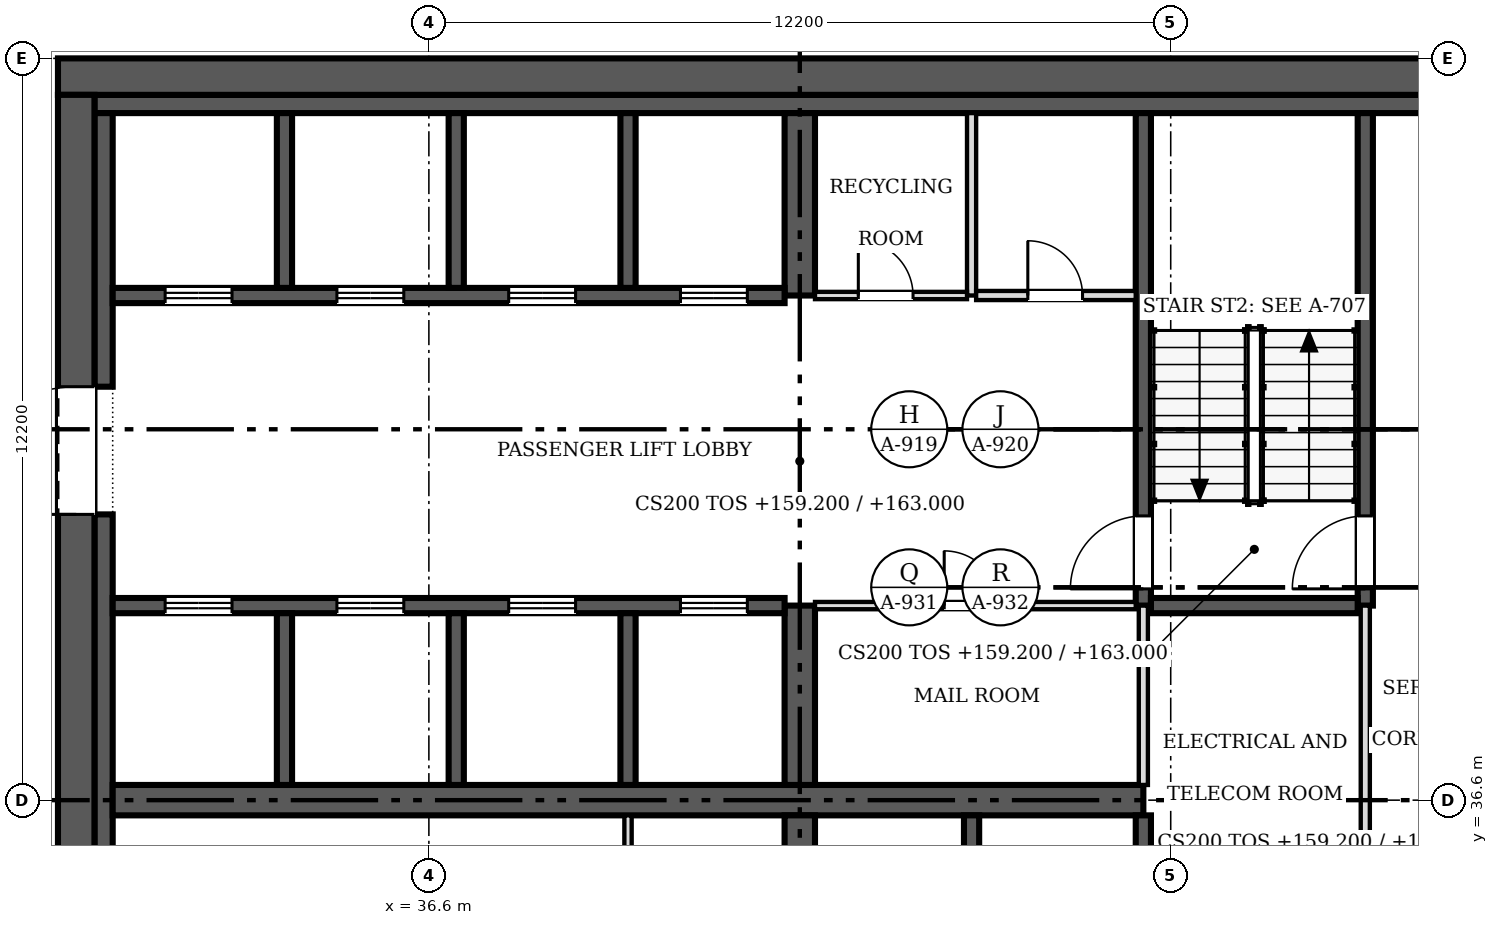
"""IFC4 building model, lengths in metres.
Left out: names, types, materials, properties, quantities, classifications, styles, units other than length and angle.
Written with IfcOpenShell. Run it as: python <this file> out.ifc"""

import sys

from ifc_helpers import new_model, si_unit, direction, frame, frame_2d, origin, place, context, subcontext, project, spatial, rectangle, extrude, source, transform, mapped, element, fill, save


model = new_model("IFC4")
c1 = context("Model", 3, precision=1e-05, world=origin(), true_north=direction((0.0, 1.0)))
c2 = subcontext(c1, "Body", "Model", "MODEL_VIEW")
j1 = project(units=[si_unit("LENGTHUNIT", "METRE"), si_unit("PLANEANGLEUNIT", "RADIAN")], contexts=[c1])
p1 = place(None, origin())
s1 = spatial("IfcSite", under=j1, at=p1, CompositionType="ELEMENT")
p2 = place(p1, origin())
s2 = spatial("IfcBuilding", under=s1, at=p2, CompositionType="ELEMENT")
p3 = place(p2, frame((0.0, 0.0, 159.2)))
s3 = spatial("IfcBuildingStorey", under=s2, at=p3, CompositionType="ELEMENT", Elevation=159.2)
p4 = place(p3, frame((30.8, 25.0, 0.0), z_axis=(0.0, 0.0, 1.0), x_axis=(0.0, 1.0, 0.0)))
e1 = element("IfcWall", 1, at=p4, inside=s3, PredefinedType="SHEAR", context=c2, shape_type="SweptSolid", body=[
    extrude(rectangle(XDim=23.2, YDim=0.6, at=frame_2d((11.6, 0.0))), origin(), (0.0, 0.0, 1.0), 3.8),
])
m1 = source(origin(), c2, "Body", "SweptSolid", [
    extrude(rectangle(XDim=2.1, YDim=2.4, at=frame_2d((1.05, 1.2))), frame((0.0, 0.31, 0.0), z_axis=(0.0, -1.0, 0.0), x_axis=(1.0, 0.0, 0.0)), (0.0, 0.0, 1.0), 0.62),
])
p5 = place(p4, frame((4.8, 0.0, 0.0)))
e2 = element("IfcOpeningElement", 2, at=p5, cuts=e1, PredefinedType="OPENING", context=c2, shape_type="MappedRepresentation", body=[
    mapped(m1, transform((0.0, 0.0, 0.0), scale=1.0)),
])
p6 = place(p4, frame((16.3, 0.0, 0.0)))
e3 = element("IfcOpeningElement", 3, at=p6, cuts=e1, PredefinedType="OPENING", context=c2, shape_type="MappedRepresentation", body=[
    mapped(m1, transform((0.0, 0.0, 0.0), scale=1.0)),
])
p7 = place(p3, frame((30.5, 48.5, 0.0), z_axis=(0.0, 0.0, 1.0), x_axis=(1.0, 0.0, 0.0)))
e4 = element("IfcWall", 4, at=p7, inside=s3, PredefinedType="SHEAR", context=c2, shape_type="SweptSolid", body=[
    extrude(rectangle(XDim=24.4, YDim=0.6, at=frame_2d((12.2, 0.0))), origin(), (0.0, 0.0, 1.0), 3.8),
])
p8 = place(p3, frame((31.1, 48.05, 0.0), z_axis=(0.0, 0.0, 1.0), x_axis=(1.0, 0.0, 0.0)))
e5 = element("IfcWall", 5, at=p8, inside=s3, PredefinedType="SOLIDWALL", context=c2, shape_type="SweptSolid", body=[
    extrude(rectangle(XDim=23.2, YDim=0.3, at=frame_2d((11.6, 0.0))), origin(), (0.0, 0.0, 1.0), 3.8),
])
p9 = place(p3, frame((31.25, 31.9, 0.0), z_axis=(0.0, 0.0, 1.0), x_axis=(0.0, 1.0, 0.0)))
e6 = element("IfcWall", 6, at=p9, inside=s3, PredefinedType="SOLIDWALL", context=c2, shape_type="SweptSolid", body=[
    extrude(rectangle(XDim=9.4, YDim=0.3, at=frame_2d((4.7, 0.0))), origin(), (0.0, 0.0, 1.0), 3.8),
])
p10 = place(p3, frame((31.25, 43.4, 0.0), z_axis=(0.0, 0.0, 1.0), x_axis=(0.0, 1.0, 0.0)))
e7 = element("IfcWall", 7, at=p10, inside=s3, PredefinedType="SOLIDWALL", context=c2, shape_type="SweptSolid", body=[
    extrude(rectangle(XDim=4.5, YDim=0.3, at=frame_2d((2.25, 0.0))), origin(), (0.0, 0.0, 1.0), 3.8),
])
p11 = place(p3, frame((31.4, 36.6, 0.0), z_axis=(0.0, 0.0, 1.0), x_axis=(1.0, 0.0, 0.0)))
e8 = element("IfcWall", 8, at=p11, inside=s3, PredefinedType="SHEAR", context=c2, shape_type="SweptSolid", body=[
    extrude(rectangle(XDim=16.95, YDim=0.5, at=frame_2d((8.475, 0.0))), origin(), (0.0, 0.0, 1.0), 3.8),
])
p12 = place(p3, frame((42.7, 36.35, 0.0), z_axis=(0.0, 0.0, 1.0), x_axis=(0.0, -1.0, 0.0)))
e9 = element("IfcWall", 9, at=p12, inside=s3, PredefinedType="SHEAR", context=c2, shape_type="SweptSolid", body=[
    extrude(rectangle(XDim=11.05, YDim=0.5, at=frame_2d((5.525, 0.0))), origin(), (0.0, 0.0, 1.0), 3.8),
])
m2 = source(origin(), c2, "Body", "SweptSolid", [
    extrude(rectangle(XDim=0.9, YDim=2.1, at=frame_2d((0.45, 1.05))), frame((0.0, 0.26, 0.0), z_axis=(0.0, -1.0, 0.0), x_axis=(1.0, 0.0, 0.0)), (0.0, 0.0, 1.0), 0.52),
])
p13 = place(p12, frame((6.5, 0.0, 0.0)))
e10 = element("IfcOpeningElement", 10, at=p13, cuts=e9, PredefinedType="OPENING", context=c2, shape_type="MappedRepresentation", body=[
    mapped(m2, transform((0.0, 0.0, 0.0), scale=1.0)),
])
m3 = source(origin(), c2, "Body", "SweptSolid", [
    extrude(rectangle(XDim=1.1, YDim=2.1, at=frame_2d((0.55, 1.05))), frame((0.0, 0.26, 0.0), z_axis=(0.0, -1.0, 0.0), x_axis=(1.0, 0.0, 0.0)), (0.0, 0.0, 1.0), 0.52),
])
p14 = place(p12, frame((3.8, 0.0, 0.0)))
e11 = element("IfcOpeningElement", 11, at=p14, cuts=e9, PredefinedType="OPENING", context=c2, shape_type="MappedRepresentation", body=[
    mapped(m3, transform((0.0, 0.0, 0.0), scale=1.0)),
])
p15 = place(p3, frame((42.7, 36.85, 0.0), z_axis=(0.0, 0.0, 1.0), x_axis=(0.0, 1.0, 0.0)))
e12 = element("IfcWall", 12, at=p15, inside=s3, PredefinedType="SHEAR", context=c2, shape_type="SweptSolid", body=[
    extrude(rectangle(XDim=2.95, YDim=0.5, at=frame_2d((1.475, 0.0))), origin(), (0.0, 0.0, 1.0), 3.8),
])
p16 = place(p3, frame((42.7, 44.9, 0.0), z_axis=(0.0, 0.0, 1.0), x_axis=(0.0, 1.0, 0.0)))
e13 = element("IfcWall", 13, at=p16, inside=s3, PredefinedType="SHEAR", context=c2, shape_type="SweptSolid", body=[
    extrude(rectangle(XDim=3.0, YDim=0.5, at=frame_2d((1.5, 0.0))), origin(), (0.0, 0.0, 1.0), 3.8),
])
p17 = place(p3, frame((31.4, 39.8, 0.0), z_axis=(0.0, 0.0, 1.0), x_axis=(1.0, 0.0, 0.0)))
e14 = element("IfcWall", 14, at=p17, inside=s3, PredefinedType="SOLIDWALL", context=c2, shape_type="SweptSolid", body=[
    extrude(rectangle(XDim=11.05, YDim=0.25, at=frame_2d((5.525, 0.0))), origin(), (0.0, 0.0, 1.0), 3.8),
])
m4 = source(origin(), c2, "Body", "SweptSolid", [
    extrude(rectangle(XDim=1.1, YDim=2.1, at=frame_2d((0.55, 1.05))), frame((0.0, 0.135, 0.0), z_axis=(0.0, -1.0, 0.0), x_axis=(1.0, 0.0, 0.0)), (0.0, 0.0, 1.0), 0.27),
])
p18 = place(p17, frame((0.863, 0.0, 0.0)))
e15 = element("IfcOpeningElement", 15, at=p18, cuts=e14, PredefinedType="OPENING", context=c2, shape_type="MappedRepresentation", body=[
    mapped(m4, transform((0.0, 0.0, 0.0), scale=1.0)),
])
p19 = place(p17, frame((3.688, 0.0, 0.0)))
e16 = element("IfcOpeningElement", 16, at=p19, cuts=e14, PredefinedType="OPENING", context=c2, shape_type="MappedRepresentation", body=[
    mapped(m4, transform((0.0, 0.0, 0.0), scale=1.0)),
])
p20 = place(p17, frame((6.512, 0.0, 0.0)))
e17 = element("IfcOpeningElement", 17, at=p20, cuts=e14, PredefinedType="OPENING", context=c2, shape_type="MappedRepresentation", body=[
    mapped(m4, transform((0.0, 0.0, 0.0), scale=1.0)),
])
p21 = place(p17, frame((9.337, 0.0, 0.0)))
e18 = element("IfcOpeningElement", 18, at=p21, cuts=e14, PredefinedType="OPENING", context=c2, shape_type="MappedRepresentation", body=[
    mapped(m4, transform((0.0, 0.0, 0.0), scale=1.0)),
])
p22 = place(p3, frame((42.45, 44.9, 0.0), z_axis=(0.0, 0.0, 1.0), x_axis=(-1.0, 0.0, 0.0)))
e19 = element("IfcWall", 19, at=p22, inside=s3, PredefinedType="SOLIDWALL", context=c2, shape_type="SweptSolid", body=[
    extrude(rectangle(XDim=11.05, YDim=0.25, at=frame_2d((5.525, 0.0))), origin(), (0.0, 0.0, 1.0), 3.8),
])
p23 = place(p22, frame((9.087, 0.0, 0.0)))
e20 = element("IfcOpeningElement", 20, at=p23, cuts=e19, PredefinedType="OPENING", context=c2, shape_type="MappedRepresentation", body=[
    mapped(m4, transform((0.0, 0.0, 0.0), scale=1.0)),
])
p24 = place(p22, frame((6.262, 0.0, 0.0)))
e21 = element("IfcOpeningElement", 21, at=p24, cuts=e19, PredefinedType="OPENING", context=c2, shape_type="MappedRepresentation", body=[
    mapped(m4, transform((0.0, 0.0, 0.0), scale=1.0)),
])
p25 = place(p22, frame((3.438, 0.0, 0.0)))
e22 = element("IfcOpeningElement", 22, at=p25, cuts=e19, PredefinedType="OPENING", context=c2, shape_type="MappedRepresentation", body=[
    mapped(m4, transform((0.0, 0.0, 0.0), scale=1.0)),
])
p26 = place(p22, frame((0.613, 0.0, 0.0)))
e23 = element("IfcOpeningElement", 23, at=p26, cuts=e19, PredefinedType="OPENING", context=c2, shape_type="MappedRepresentation", body=[
    mapped(m4, transform((0.0, 0.0, 0.0), scale=1.0)),
])
p27 = place(p3, frame((48.35, 36.35, 0.0), z_axis=(0.0, 0.0, 1.0), x_axis=(0.0, -1.0, 0.0)))
e24 = element("IfcWall", 24, at=p27, inside=s3, PredefinedType="SOLIDWALL", context=c2, shape_type="SweptSolid", body=[
    extrude(rectangle(XDim=11.05, YDim=0.25, at=frame_2d((5.525, 0.0))), origin(), (0.0, 0.0, 1.0), 3.8),
])
m5 = source(origin(), c2, "Body", "SweptSolid", [
    extrude(rectangle(XDim=1.2, YDim=2.1, at=frame_2d((0.6, 1.05))), frame((0.0, 0.135, 0.0), z_axis=(0.0, -1.0, 0.0), x_axis=(1.0, 0.0, 0.0)), (0.0, 0.0, 1.0), 0.27),
])
p28 = place(p27, frame((3.225, 0.0, 0.0)))
e25 = element("IfcOpeningElement", 25, at=p28, cuts=e24, PredefinedType="OPENING", context=c2, shape_type="MappedRepresentation", body=[
    mapped(m5, transform((0.0, 0.0, 0.0), scale=1.0)),
])
p29 = place(p3, frame((48.35, 47.9, 0.0), z_axis=(0.0, 0.0, 1.0), x_axis=(0.0, -1.0, 0.0)))
e26 = element("IfcWall", 26, at=p29, inside=s3, PredefinedType="SOLIDWALL", context=c2, shape_type="SweptSolid", body=[
    extrude(rectangle(XDim=8.1, YDim=0.25, at=frame_2d((4.05, 0.0))), origin(), (0.0, 0.0, 1.0), 3.8),
])
p30 = place(p29, frame((6.625, 0.0, 0.0)))
e27 = element("IfcOpeningElement", 27, at=p30, cuts=e26, PredefinedType="OPENING", context=c2, shape_type="MappedRepresentation", body=[
    mapped(m5, transform((0.0, 0.0, 0.0), scale=1.0)),
])
p31 = place(p3, frame((52.0, 39.8, 0.0), z_axis=(0.0, 0.0, 1.0), x_axis=(0.0, 1.0, 0.0)))
e28 = element("IfcWall", 28, at=p31, inside=s3, PredefinedType="SOLIDWALL", context=c2, shape_type="SweptSolid", body=[
    extrude(rectangle(XDim=8.1, YDim=0.25, at=frame_2d((4.05, 0.0))), origin(), (0.0, 0.0, 1.0), 3.8),
])
p32 = place(p31, frame((0.275, 0.0, 0.0)))
e29 = element("IfcOpeningElement", 29, at=p32, cuts=e28, PredefinedType="OPENING", context=c2, shape_type="MappedRepresentation", body=[
    mapped(m5, transform((0.0, 0.0, 0.0), scale=1.0)),
])
p33 = place(p3, frame((48.475, 39.8, 0.0), z_axis=(0.0, 0.0, 1.0), x_axis=(1.0, 0.0, 0.0)))
e30 = element("IfcWall", 30, at=p33, inside=s3, PredefinedType="SOLIDWALL", context=c2, shape_type="SweptSolid", body=[
    extrude(rectangle(XDim=3.4, YDim=0.25, at=frame_2d((1.7, 0.0))), origin(), (0.0, 0.0, 1.0), 3.8),
])
for number, where, z_axis, x_axis in (
    (31, (34.225, 36.85, 0.0), (0.0, 0.0, 1.0), (0.0, 1.0, 0.0)),
    (32, (37.05, 36.85, 0.0), (0.0, 0.0, 1.0), (0.0, 1.0, 0.0)),
    (33, (39.875, 36.85, 0.0), (0.0, 0.0, 1.0), (0.0, 1.0, 0.0)),
):
    element("IfcWall", number, at=place(p3, frame(where, z_axis=z_axis, x_axis=x_axis)), inside=s3, PredefinedType="SOLIDWALL", context=c2, shape_type="SweptSolid", body=[
        extrude(rectangle(XDim=2.825, YDim=0.25, at=frame_2d((1.413, 0.0))), origin(), (0.0, 0.0, 1.0), 3.8),
    ])
p34 = place(p3, frame((45.525, 33.525, 0.0), z_axis=(0.0, 0.0, 1.0), x_axis=(0.0, 1.0, 0.0)))
e34 = element("IfcWall", 34, at=p34, inside=s3, PredefinedType="SOLIDWALL", context=c2, shape_type="SweptSolid", body=[
    extrude(rectangle(XDim=2.825, YDim=0.25, at=frame_2d((1.413, 0.0))), origin(), (0.0, 0.0, 1.0), 3.8),
])
for number, where, z_axis, x_axis in (
    (35, (34.225, 45.025, 0.0), (0.0, 0.0, 1.0), (0.0, 1.0, 0.0)),
    (36, (37.05, 45.025, 0.0), (0.0, 0.0, 1.0), (0.0, 1.0, 0.0)),
    (37, (39.875, 45.025, 0.0), (0.0, 0.0, 1.0), (0.0, 1.0, 0.0)),
):
    element("IfcWall", number, at=place(p3, frame(where, z_axis=z_axis, x_axis=x_axis)), inside=s3, PredefinedType="SOLIDWALL", context=c2, shape_type="SweptSolid", body=[
        extrude(rectangle(XDim=2.875, YDim=0.25, at=frame_2d((1.438, 0.0))), origin(), (0.0, 0.0, 1.0), 3.8),
    ])
p35 = place(p3, frame((52.0, 33.525, 0.0), z_axis=(0.0, 0.0, 1.0), x_axis=(0.0, 1.0, 0.0)))
e38 = element("IfcWall", 38, at=p35, inside=s3, PredefinedType="PARTITIONING", context=c2, shape_type="SweptSolid", body=[
    extrude(rectangle(XDim=6.275, YDim=0.15, at=frame_2d((3.138, 0.0))), origin(), (0.0, 0.0, 1.0), 3.6),
])
m6 = source(origin(), c2, "Body", "SweptSolid", [
    extrude(rectangle(XDim=0.9, YDim=2.1, at=frame_2d((0.45, 1.05))), frame((0.0, 0.085, 0.0), z_axis=(0.0, -1.0, 0.0), x_axis=(1.0, 0.0, 0.0)), (0.0, 0.0, 1.0), 0.17),
])
p36 = place(p35, frame((1.025, 0.0, 0.0)))
e39 = element("IfcOpeningElement", 39, at=p36, cuts=e38, PredefinedType="OPENING", context=c2, shape_type="MappedRepresentation", body=[
    mapped(m6, transform((0.0, 0.0, 0.0), scale=1.0)),
])
p37 = place(p3, frame((48.225, 39.8, 0.0), z_axis=(0.0, 0.0, 1.0), x_axis=(-1.0, 0.0, 0.0)))
e40 = element("IfcWall", 40, at=p37, inside=s3, PredefinedType="PARTITIONING", context=c2, shape_type="SweptSolid", body=[
    extrude(rectangle(XDim=5.275, YDim=0.12, at=frame_2d((2.638, 0.0))), origin(), (0.0, 0.0, 1.0), 3.6),
])
m7 = source(origin(), c2, "Body", "SweptSolid", [
    extrude(rectangle(XDim=0.9, YDim=2.1, at=frame_2d((0.45, 1.05))), frame((0.0, 0.07, 0.0), z_axis=(0.0, -1.0, 0.0), x_axis=(1.0, 0.0, 0.0)), (0.0, 0.0, 1.0), 0.14),
])
p38 = place(p37, frame((2.25, 0.0, 0.0)))
e41 = element("IfcOpeningElement", 41, at=p38, cuts=e40, PredefinedType="OPENING", context=c2, shape_type="MappedRepresentation", body=[
    mapped(m7, transform((0.0, 0.0, 0.0), scale=1.0)),
])
p39 = place(p3, frame((48.35, 36.85, 0.0), z_axis=(0.0, 0.0, 1.0), x_axis=(0.0, 1.0, 0.0)))
e42 = element("IfcWall", 42, at=p39, inside=s3, PredefinedType="PARTITIONING", context=c2, shape_type="SweptSolid", body=[
    extrude(rectangle(XDim=2.95, YDim=0.15, at=frame_2d((1.475, 0.0))), origin(), (0.0, 0.0, 1.0), 3.6),
])
p40 = place(p3, frame((39.875, 33.46, 0.0), z_axis=(0.0, 0.0, 1.0), x_axis=(0.0, 1.0, 0.0)))
e43 = element("IfcWall", 43, at=p40, inside=s3, PredefinedType="PARTITIONING", context=c2, shape_type="SweptSolid", body=[
    extrude(rectangle(XDim=2.89, YDim=0.12, at=frame_2d((1.445, 0.0))), origin(), (0.0, 0.0, 1.0), 3.6),
])
p41 = place(p3, frame((45.525, 44.9, 0.0), z_axis=(0.0, 0.0, 1.0), x_axis=(0.0, 1.0, 0.0)))
e44 = element("IfcWall", 44, at=p41, inside=s3, PredefinedType="PARTITIONING", context=c2, shape_type="SweptSolid", body=[
    extrude(rectangle(XDim=3.0, YDim=0.15, at=frame_2d((1.5, 0.0))), origin(), (0.0, 0.0, 1.0), 3.6),
])
p42 = place(p3, frame((42.95, 44.9, 0.0), z_axis=(0.0, 0.0, 1.0), x_axis=(1.0, 0.0, 0.0)))
e45 = element("IfcWall", 45, at=p42, inside=s3, PredefinedType="PARTITIONING", context=c2, shape_type="SweptSolid", body=[
    extrude(rectangle(XDim=2.5, YDim=0.12, at=frame_2d((1.25, 0.0))), origin(), (0.0, 0.0, 1.0), 3.6),
])
p43 = place(p42, frame((0.712, 0.0, 0.0)))
e46 = element("IfcOpeningElement", 46, at=p43, cuts=e45, PredefinedType="OPENING", context=c2, shape_type="MappedRepresentation", body=[
    mapped(m7, transform((0.0, 0.0, 0.0), scale=1.0)),
])
p44 = place(p3, frame((45.6, 44.9, 0.0), z_axis=(0.0, 0.0, 1.0), x_axis=(1.0, 0.0, 0.0)))
e47 = element("IfcWall", 47, at=p44, inside=s3, PredefinedType="PARTITIONING", context=c2, shape_type="SweptSolid", body=[
    extrude(rectangle(XDim=2.625, YDim=0.15, at=frame_2d((1.312, 0.0))), origin(), (0.0, 0.0, 1.0), 3.6),
])
p45 = place(p44, frame((0.85, 0.0, 0.0)))
e48 = element("IfcOpeningElement", 48, at=p45, cuts=e47, PredefinedType="OPENING", context=c2, shape_type="MappedRepresentation", body=[
    mapped(m6, transform((0.0, 0.0, 0.0), scale=1.0)),
])
m8 = source(origin(), c2, "Body", "SweptSolid", [
    extrude(rectangle(XDim=2.1, YDim=2.4, at=frame_2d((1.05, 1.2))), frame((0.0, 0.025, 0.0), z_axis=(0.0, -1.0, 0.0), x_axis=(1.0, 0.0, 0.0)), (0.0, 0.0, 1.0), 0.05),
])
p46 = place(p6, origin())
e49 = element("IfcDoor", 49, at=p46, inside=s3, OperationType="DOUBLE_DOOR_SINGLE_SWING", PredefinedType="DOOR", context=c2, shape_type="MappedRepresentation", body=[
    mapped(m8, transform((0.0, 0.0, 0.0), scale=1.0)),
])
fill(e3, e49)
m9 = source(origin(), c2, "Body", "SweptSolid", [
    extrude(rectangle(XDim=1.1, YDim=2.1, at=frame_2d((0.55, 1.05))), frame((0.0, 0.025, 0.0), z_axis=(0.0, -1.0, 0.0), x_axis=(1.0, 0.0, 0.0)), (0.0, 0.0, 1.0), 0.05),
])
p47 = place(p18, origin())
e50 = element("IfcDoor", 50, at=p47, inside=s3, OperationType="DOUBLE_DOOR_SLIDING", PredefinedType="DOOR", context=c2, shape_type="MappedRepresentation", body=[
    mapped(m9, transform((0.0, 0.0, 0.0), scale=1.0)),
])
fill(e15, e50)
p48 = place(p19, origin())
e51 = element("IfcDoor", 51, at=p48, inside=s3, OperationType="DOUBLE_DOOR_SLIDING", PredefinedType="DOOR", context=c2, shape_type="MappedRepresentation", body=[
    mapped(m9, transform((0.0, 0.0, 0.0), scale=1.0)),
])
fill(e16, e51)
p49 = place(p20, origin())
e52 = element("IfcDoor", 52, at=p49, inside=s3, OperationType="DOUBLE_DOOR_SLIDING", PredefinedType="DOOR", context=c2, shape_type="MappedRepresentation", body=[
    mapped(m9, transform((0.0, 0.0, 0.0), scale=1.0)),
])
fill(e17, e52)
p50 = place(p21, origin())
e53 = element("IfcDoor", 53, at=p50, inside=s3, OperationType="DOUBLE_DOOR_SLIDING", PredefinedType="DOOR", context=c2, shape_type="MappedRepresentation", body=[
    mapped(m9, transform((0.0, 0.0, 0.0), scale=1.0)),
])
fill(e18, e53)
p51 = place(p23, origin())
e54 = element("IfcDoor", 54, at=p51, inside=s3, OperationType="DOUBLE_DOOR_SLIDING", PredefinedType="DOOR", context=c2, shape_type="MappedRepresentation", body=[
    mapped(m9, transform((0.0, 0.0, 0.0), scale=1.0)),
])
fill(e20, e54)
p52 = place(p24, origin())
e55 = element("IfcDoor", 55, at=p52, inside=s3, OperationType="DOUBLE_DOOR_SLIDING", PredefinedType="DOOR", context=c2, shape_type="MappedRepresentation", body=[
    mapped(m9, transform((0.0, 0.0, 0.0), scale=1.0)),
])
fill(e21, e55)
p53 = place(p25, origin())
e56 = element("IfcDoor", 56, at=p53, inside=s3, OperationType="DOUBLE_DOOR_SLIDING", PredefinedType="DOOR", context=c2, shape_type="MappedRepresentation", body=[
    mapped(m9, transform((0.0, 0.0, 0.0), scale=1.0)),
])
fill(e22, e56)
p54 = place(p26, origin())
e57 = element("IfcDoor", 57, at=p54, inside=s3, OperationType="DOUBLE_DOOR_SLIDING", PredefinedType="DOOR", context=c2, shape_type="MappedRepresentation", body=[
    mapped(m9, transform((0.0, 0.0, 0.0), scale=1.0)),
])
fill(e23, e57)
m10 = source(origin(), c2, "Body", "SweptSolid", [
    extrude(rectangle(XDim=1.2, YDim=2.1, at=frame_2d((0.6, 1.05))), frame((0.0, 0.025, 0.0), z_axis=(0.0, -1.0, 0.0), x_axis=(1.0, 0.0, 0.0)), (0.0, 0.0, 1.0), 0.05),
])
p55 = place(p30, origin())
e58 = element("IfcDoor", 58, at=p55, inside=s3, OperationType="SINGLE_SWING_RIGHT", PredefinedType="DOOR", context=c2, shape_type="MappedRepresentation", body=[
    mapped(m10, transform((0.0, 0.0, 0.0), scale=1.0)),
])
fill(e27, e58)
p56 = place(p32, origin())
e59 = element("IfcDoor", 59, at=p56, inside=s3, OperationType="SINGLE_SWING_LEFT", PredefinedType="DOOR", context=c2, shape_type="MappedRepresentation", body=[
    mapped(m10, transform((0.0, 0.0, 0.0), scale=1.0)),
])
fill(e29, e59)
m11 = source(origin(), c2, "Body", "SweptSolid", [
    extrude(rectangle(XDim=0.9, YDim=2.1, at=frame_2d((0.45, 1.05))), frame((0.0, 0.025, 0.0), z_axis=(0.0, -1.0, 0.0), x_axis=(1.0, 0.0, 0.0)), (0.0, 0.0, 1.0), 0.05),
])
p57 = place(p38, origin())
e60 = element("IfcDoor", 60, at=p57, inside=s3, OperationType="SINGLE_SWING_RIGHT", PredefinedType="DOOR", context=c2, shape_type="MappedRepresentation", body=[
    mapped(m11, transform((0.0, 0.0, 0.0), scale=1.0)),
])
fill(e41, e60)
p58 = place(p43, origin())
e61 = element("IfcDoor", 61, at=p58, inside=s3, OperationType="SINGLE_SWING_LEFT", PredefinedType="DOOR", context=c2, shape_type="MappedRepresentation", body=[
    mapped(m11, transform((0.0, 0.0, 0.0), scale=1.0)),
])
fill(e46, e61)
p59 = place(p45, origin())
e62 = element("IfcDoor", 62, at=p59, inside=s3, OperationType="SINGLE_SWING_LEFT", PredefinedType="DOOR", context=c2, shape_type="MappedRepresentation", body=[
    mapped(m11, transform((0.0, 0.0, 0.0), scale=1.0)),
])
fill(e48, e62)
save(model, sys.argv[1])
